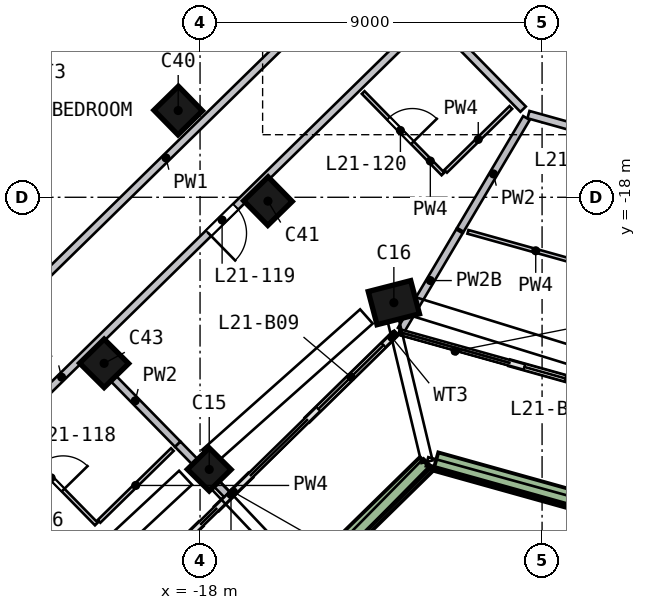
"""IFC4 building model, lengths in metres.
Left out: names, types, materials, properties, quantities, classifications, styles, units other than length and angle.
Written with IfcOpenShell. Run it as: python <this file> out.ifc"""

import sys

from ifc_helpers import new_model, si_unit, direction, frame, frame_2d, origin, origin_2d, place, context, subcontext, project, spatial, rectangle, extrude, element, fill, save


model = new_model("IFC4")
c1 = context("Model", 3, precision=1e-05, world=origin(), true_north=direction((0.0, 1.0)))
c2 = subcontext(c1, "Body", "Model", "MODEL_VIEW")
j1 = project(units=[si_unit("LENGTHUNIT", "METRE"), si_unit("PLANEANGLEUNIT", "RADIAN")], contexts=[c1])
p1 = place(None, origin())
s1 = spatial("IfcSite", under=j1, at=p1, CompositionType="ELEMENT")
p2 = place(p1, origin())
s2 = spatial("IfcBuilding", under=s1, at=p2, CompositionType="ELEMENT")
p3 = place(p2, frame((0.0, 0.0, 93.0)))
s3 = spatial("IfcBuildingStorey", under=s2, at=p3, CompositionType="ELEMENT", Elevation=93.0)
p4 = place(p3, frame((-17.97, -25.128, 0.0), z_axis=(0.173806218, -0.028251986, 0.984374534), x_axis=(0.700000107, 0.706629929, -0.103315018)))
e1 = element("IfcColumn", 1, at=p4, inside=s3, PredefinedType="COLUMN", context=c2, shape_type="SweptSolid", body=[
    extrude(rectangle(XDim=0.8, YDim=0.8, at=origin_2d()), origin(), (0.0, 0.0, 1.0), 3.24),
])
p5 = place(p3, frame((-13.02, -20.7, 0.0), z_axis=(0.098896689, -0.061040769, 0.993223776), x_axis=(-0.963723758, -0.254530475, 0.080316596)))
e2 = element("IfcColumn", 2, at=p5, inside=s3, PredefinedType="COLUMN", context=c2, shape_type="SweptSolid", body=[
    extrude(rectangle(XDim=1.15, YDim=0.9, at=origin_2d()), origin(), (0.0, 0.0, 1.0), 3.212),
])
for number, where, z_axis, x_axis in (
    (3, (-18.666, -15.611, 0.0), (0.075, -0.088, 0.993), (-0.715, -0.699, -0.008)),
    (4, (-16.317, -18.009, 0.0), (0.086, -0.077, 0.993), (-0.714, -0.7, 0.008)),
):
    element("IfcColumn", number, at=place(p3, frame(where, z_axis=z_axis, x_axis=x_axis)), inside=s3, PredefinedType="COLUMN", context=c2, shape_type="SweptSolid", body=[
        extrude(rectangle(XDim=0.9, YDim=0.9, at=origin_2d()), origin(), (0.0, 0.0, 1.0), 3.211),
    ])
p6 = place(p3, frame((-20.72, -22.32, 0.0), z_axis=(0.160977031, -0.041432907, 0.986088084), x_axis=(-0.70323062, -0.705845109, 0.085143269)))
e5 = element("IfcColumn", 5, at=p6, inside=s3, PredefinedType="COLUMN", context=c2, shape_type="SweptSolid", body=[
    extrude(rectangle(XDim=0.9, YDim=0.9, at=origin_2d()), origin(), (0.0, 0.0, 1.0), 3.235),
])
p7 = place(p3, frame((-21.877, -12.431, 0.0), z_axis=(0.0, 0.0, 1.0), x_axis=(-0.71448032, -0.699655539, 0.0)))
e6 = element("IfcWall", 6, at=p7, inside=s3, PredefinedType="SOLIDWALL", context=c2, shape_type="SweptSolid", body=[
    extrude(rectangle(XDim=3.294, YDim=0.15, at=frame_2d((1.647, 0.0))), origin(), (0.0, 0.0, 1.0), 2.425),
])
p8 = place(p7, frame((0.494, 0.0, 0.0)))
e7 = element("IfcOpeningElement", 7, at=p8, cuts=e6, PredefinedType="OPENING", context=c2, shape_type="SweptSolid", body=[
    extrude(rectangle(XDim=2.4, YDim=2.4, at=frame_2d((1.2, 1.2))), frame((0.0, 0.085, 0.0), z_axis=(0.0, -1.0, 0.0), x_axis=(1.0, 0.0, 0.0)), (0.0, 0.0, 1.0), 0.17),
])
p9 = place(p3, frame((-21.485, -30.032, 0.0), z_axis=(0.0, 0.0, 1.0), x_axis=(0.714467355, 0.699668778, 0.0)))
e8 = element("IfcWall", 8, at=p9, inside=s3, PredefinedType="SOLIDWALL", context=c2, shape_type="SweptSolid", body=[
    extrude(rectangle(XDim=4.9, YDim=0.15, at=frame_2d((2.45, 0.0))), origin(), (0.0, 0.0, 1.0), 2.425),
])
p10 = place(p9, frame((2.1, 0.0, 0.0)))
e9 = element("IfcOpeningElement", 9, at=p10, cuts=e8, PredefinedType="OPENING", context=c2, shape_type="SweptSolid", body=[
    extrude(rectangle(XDim=2.4, YDim=2.4, at=frame_2d((1.2, 1.2))), frame((0.0, 0.085, 0.0), z_axis=(0.0, -1.0, 0.0), x_axis=(1.0, 0.0, 0.0)), (0.0, 0.0, 1.0), 0.17),
])
p11 = place(p3, frame((-15.173, -23.851, 0.0), z_axis=(0.0, 0.0, 1.0), x_axis=(0.714468315, 0.699667797, 0.0)))
e10 = element("IfcWall", 10, at=p11, inside=s3, PredefinedType="SOLIDWALL", context=c2, shape_type="SweptSolid", body=[
    extrude(rectangle(XDim=3.2, YDim=0.15, at=frame_2d((1.6, 0.0))), origin(), (0.0, 0.0, 1.0), 2.425),
])
p12 = place(p11, frame((0.4, 0.0, 0.0)))
e11 = element("IfcOpeningElement", 11, at=p12, cuts=e10, PredefinedType="OPENING", context=c2, shape_type="SweptSolid", body=[
    extrude(rectangle(XDim=2.4, YDim=2.4, at=frame_2d((1.2, 1.2))), frame((0.0, 0.085, 0.0), z_axis=(0.0, -1.0, 0.0), x_axis=(1.0, 0.0, 0.0)), (0.0, 0.0, 1.0), 0.17),
])
p13 = place(p3, frame((-17.561, -26.189, 0.0), z_axis=(0.0, 0.0, 1.0), x_axis=(0.714463189, 0.699673032, 0.0)))
e12 = element("IfcWall", 12, at=p13, inside=s3, PredefinedType="SOLIDWALL", context=c2, shape_type="SweptSolid", body=[
    extrude(rectangle(XDim=1.238, YDim=0.15, at=frame_2d((0.619, 0.0))), origin(), (0.0, 0.0, 1.0), 2.425),
])
p14 = place(p3, frame((-9.85, -22.358, 0.0), z_axis=(0.0, 0.0, 1.0), x_axis=(0.96315568, -0.268944485, 0.0)))
e13 = element("IfcWall", 13, at=p14, inside=s3, PredefinedType="SOLIDWALL", context=c2, shape_type="SweptSolid", body=[
    extrude(rectangle(XDim=3.475, YDim=0.15, at=frame_2d((1.737, 0.0))), origin(), (0.0, 0.0, 1.0), 2.425),
])
p15 = place(p14, frame((0.4, 0.0, 0.0)))
e14 = element("IfcOpeningElement", 14, at=p15, cuts=e13, PredefinedType="OPENING", context=c2, shape_type="SweptSolid", body=[
    extrude(rectangle(XDim=2.4, YDim=2.4, at=frame_2d((1.2, 1.2))), frame((0.0, 0.085, 0.0), z_axis=(0.0, -1.0, 0.0), x_axis=(1.0, 0.0, 0.0)), (0.0, 0.0, 1.0), 0.17),
])
p16 = place(p3, frame((-19.168, -31.997, 0.0), z_axis=(0.0, 0.0, 1.0), x_axis=(0.714470668, 0.699665395, 0.0)))
e15 = element("IfcWall", 15, at=p16, inside=s3, PredefinedType="SOLIDWALL", context=c2, shape_type="SweptSolid", body=[
    extrude(rectangle(XDim=9.977, YDim=0.5, at=frame_2d((4.988, 0.0))), origin(), (0.0, 0.0, 1.0), 0.7),
])
p17 = place(p3, frame((-11.798, -24.955, 0.0), z_axis=(0.0, 0.0, 1.0), x_axis=(0.963157935, -0.26893641, 0.0)))
e16 = element("IfcWall", 16, at=p17, inside=s3, PredefinedType="SOLIDWALL", context=c2, shape_type="SweptSolid", body=[
    extrude(rectangle(XDim=11.152, YDim=0.5, at=frame_2d((5.576, 0.0))), origin(), (0.0, 0.0, 1.0), 0.7),
])
p18 = place(p3, frame((-26.907, -24.809, 0.0), z_axis=(0.0, 0.0, 1.0), x_axis=(0.714474521, 0.699661461, 0.0)))
e17 = element("IfcWall", 17, at=p18, inside=s3, PredefinedType="SOLIDWALL", context=c2, shape_type="SweptSolid", body=[
    extrude(rectangle(XDim=18.624, YDim=0.2, at=frame_2d((9.312, 0.0))), origin(), (0.0, 0.0, 1.0), 3.19),
])
p19 = place(p18, frame((2.6, 0.0, 0.0)))
e18 = element("IfcOpeningElement", 18, at=p19, cuts=e17, PredefinedType="OPENING", context=c2, shape_type="SweptSolid", body=[
    extrude(rectangle(XDim=1.0, YDim=2.1, at=frame_2d((0.5, 1.05))), frame((0.0, 0.11, 0.0), z_axis=(0.0, -1.0, 0.0), x_axis=(1.0, 0.0, 0.0)), (0.0, 0.0, 1.0), 0.22),
])
p20 = place(p3, frame((-12.061, -13.351, 0.0), z_axis=(0.0, 0.0, 1.0), x_axis=(-0.714474521, -0.699661461, 0.0)))
e19 = element("IfcWall", 19, at=p20, inside=s3, PredefinedType="SOLIDWALL", context=c2, shape_type="SweptSolid", body=[
    extrude(rectangle(XDim=18.624, YDim=0.2, at=frame_2d((9.312, 0.0))), origin(), (0.0, 0.0, 1.0), 3.19),
])
p21 = place(p20, frame((7.0, 0.0, 0.0)))
e20 = element("IfcOpeningElement", 20, at=p21, cuts=e19, PredefinedType="OPENING", context=c2, shape_type="SweptSolid", body=[
    extrude(rectangle(XDim=1.0, YDim=2.1, at=frame_2d((0.5, 1.05))), frame((0.0, 0.11, 0.0), z_axis=(0.0, -1.0, 0.0), x_axis=(1.0, 0.0, 0.0)), (0.0, 0.0, 1.0), 0.22),
])
p22 = place(p3, frame((-11.918, -13.211, 0.0), z_axis=(0.0, 0.0, 1.0), x_axis=(0.699655576, -0.714480283, 0.0)))
e21 = element("IfcWall", 21, at=p22, inside=s3, PredefinedType="SOLIDWALL", context=c2, shape_type="SweptSolid", body=[
    extrude(rectangle(XDim=3.458, YDim=0.2, at=frame_2d((1.729, 0.0))), origin(), (0.0, 0.0, 1.0), 3.19),
])
p23 = place(p3, frame((-0.192, -18.384, 0.0), z_axis=(0.0, 0.0, 1.0), x_axis=(-0.963160921, 0.268925714, 0.0)))
e22 = element("IfcWall", 22, at=p23, inside=s3, PredefinedType="SOLIDWALL", context=c2, shape_type="SweptSolid", body=[
    extrude(rectangle(XDim=9.517, YDim=0.2, at=frame_2d((4.758, 0.0))), origin(), (0.0, 0.0, 1.0), 3.19),
])
p24 = place(p23, frame((1.9, 0.0, 0.0)))
e23 = element("IfcOpeningElement", 23, at=p24, cuts=e22, PredefinedType="OPENING", context=c2, shape_type="SweptSolid", body=[
    extrude(rectangle(XDim=1.0, YDim=2.1, at=frame_2d((0.5, 1.05))), frame((0.0, 0.11, 0.0), z_axis=(0.0, -1.0, 0.0), x_axis=(1.0, 0.0, 0.0)), (0.0, 0.0, 1.0), 0.22),
])
p25 = place(p3, frame((-20.825, -22.213, 0.0), z_axis=(0.0, 0.0, 1.0), x_axis=(0.699705936, -0.714430965, 0.0)))
e24 = element("IfcWall", 24, at=p25, inside=s3, PredefinedType="SOLIDWALL", context=c2, shape_type="SweptSolid", body=[
    extrude(rectangle(XDim=3.2, YDim=0.2, at=frame_2d((1.6, 0.0))), origin(), (0.0, 0.0, 1.0), 3.19),
])
p26 = place(p3, frame((-18.586, -24.499, 0.0), z_axis=(0.0, 0.0, 1.0), x_axis=(0.699678126, -0.7144582, 0.0)))
e25 = element("IfcWall", 25, at=p26, inside=s3, PredefinedType="SOLIDWALL", context=c2, shape_type="SweptSolid", body=[
    extrude(rectangle(XDim=1.85, YDim=0.2, at=frame_2d((0.925, 0.0))), origin(), (0.0, 0.0, 1.0), 3.19),
])
p27 = place(p3, frame((-11.175, -18.896, 0.0), z_axis=(0.0, 0.0, 1.0), x_axis=(-0.509048846, -0.860737633, 0.0)))
e26 = element("IfcWall", 26, at=p27, inside=s3, PredefinedType="SOLIDWALL", context=c2, shape_type="SweptSolid", body=[
    extrude(rectangle(XDim=3.011, YDim=0.2, at=frame_2d((1.506, 0.0))), origin(), (0.0, 0.0, 1.0), 2.69),
])
p28 = place(p3, frame((-9.411, -15.914, 0.0), z_axis=(0.0, 0.0, 1.0), x_axis=(-0.50904451, -0.860740197, 0.0)))
e27 = element("IfcWall", 27, at=p28, inside=s3, PredefinedType="SOLIDWALL", context=c2, shape_type="SweptSolid", body=[
    extrude(rectangle(XDim=3.418, YDim=0.2, at=frame_2d((1.709, 0.0))), origin(), (0.0, 0.0, 1.0), 3.19),
])
p29 = place(p3, frame((-22.968, -24.312, 0.0), z_axis=(0.0, 0.0, 1.0), x_axis=(0.69962885, -0.714506454, 0.0)))
e28 = element("IfcWall", 28, at=p29, inside=s3, PredefinedType="PARTITIONING", context=c2, shape_type="SweptSolid", body=[
    extrude(rectangle(XDim=3.2, YDim=0.1, at=frame_2d((1.6, 0.0))), origin(), (0.0, 0.0, 1.0), 3.19),
])
p30 = place(p29, frame((1.05, 0.0, 0.0)))
e29 = element("IfcOpeningElement", 29, at=p30, cuts=e28, PredefinedType="OPENING", context=c2, shape_type="SweptSolid", body=[
    extrude(rectangle(XDim=0.9, YDim=2.1, at=frame_2d((0.45, 1.05))), frame((0.0, 0.06, 0.0), z_axis=(0.0, -1.0, 0.0), x_axis=(1.0, 0.0, 0.0)), (0.0, 0.0, 1.0), 0.12),
])
p31 = place(p3, frame((-20.658, -26.528, 0.0), z_axis=(0.0, 0.0, 1.0), x_axis=(0.714437911, 0.699698843, 0.0)))
e30 = element("IfcWall", 30, at=p31, inside=s3, PredefinedType="PARTITIONING", context=c2, shape_type="SweptSolid", body=[
    extrude(rectangle(XDim=2.7, YDim=0.1, at=frame_2d((1.35, 0.0))), origin(), (0.0, 0.0, 1.0), 3.19),
])
p32 = place(p3, frame((-13.708, -15.243, 0.0), z_axis=(0.0, 0.0, 1.0), x_axis=(0.699703553, -0.714433298, 0.0)))
e31 = element("IfcWall", 31, at=p32, inside=s3, PredefinedType="PARTITIONING", context=c2, shape_type="SweptSolid", body=[
    extrude(rectangle(XDim=3.0, YDim=0.1, at=frame_2d((1.5, 0.0))), origin(), (0.0, 0.0, 1.0), 3.19),
])
p33 = place(p32, frame((0.95, 0.0, 0.0)))
e32 = element("IfcOpeningElement", 32, at=p33, cuts=e31, PredefinedType="OPENING", context=c2, shape_type="SweptSolid", body=[
    extrude(rectangle(XDim=0.9, YDim=2.1, at=frame_2d((0.45, 1.05))), frame((0.0, 0.06, 0.0), z_axis=(0.0, -1.0, 0.0), x_axis=(1.0, 0.0, 0.0)), (0.0, 0.0, 1.0), 0.12),
])
p34 = place(p3, frame((-9.822, -15.637, 0.0), z_axis=(0.0, 0.0, 1.0), x_axis=(-0.714443678, -0.699692954, 0.0)))
e33 = element("IfcWall", 33, at=p34, inside=s3, PredefinedType="PARTITIONING", context=c2, shape_type="SweptSolid", body=[
    extrude(rectangle(XDim=2.4, YDim=0.1, at=frame_2d((1.2, 0.0))), origin(), (0.0, 0.0, 1.0), 3.19),
])
p35 = place(p3, frame((-10.951, -18.91, 0.0), z_axis=(0.0, 0.0, 1.0), x_axis=(0.963158191, -0.268935493, 0.0)))
e34 = element("IfcWall", 34, at=p35, inside=s3, PredefinedType="PARTITIONING", context=c2, shape_type="SweptSolid", body=[
    extrude(rectangle(XDim=3.704, YDim=0.1, at=frame_2d((1.852, 0.0))), origin(), (0.0, 0.0, 1.0), 3.19),
])
p36 = place(p12, origin())
e35 = element("IfcDoor", 35, at=p36, inside=s3, OperationType="SLIDING_TO_RIGHT", PredefinedType="DOOR", context=c2, shape_type="SweptSolid", body=[
    extrude(rectangle(XDim=2.4, YDim=2.4, at=frame_2d((1.2, 1.2))), frame((0.0, 0.025, 0.0), z_axis=(0.0, -1.0, 0.0), x_axis=(1.0, 0.0, 0.0)), (0.0, 0.0, 1.0), 0.05),
])
fill(e11, e35)
p37 = place(p15, origin())
e36 = element("IfcDoor", 36, at=p37, inside=s3, OperationType="SLIDING_TO_RIGHT", PredefinedType="DOOR", context=c2, shape_type="SweptSolid", body=[
    extrude(rectangle(XDim=2.4, YDim=2.4, at=frame_2d((1.2, 1.2))), frame((0.0, 0.025, 0.0), z_axis=(0.0, -1.0, 0.0), x_axis=(1.0, 0.0, 0.0)), (0.0, 0.0, 1.0), 0.05),
])
fill(e14, e36)
p38 = place(p30, origin())
e37 = element("IfcDoor", 37, at=p38, inside=s3, OperationType="SINGLE_SWING_RIGHT", PredefinedType="DOOR", context=c2, shape_type="SweptSolid", body=[
    extrude(rectangle(XDim=0.9, YDim=2.1, at=frame_2d((0.45, 1.05))), frame((0.0, 0.025, 0.0), z_axis=(0.0, -1.0, 0.0), x_axis=(1.0, 0.0, 0.0)), (0.0, 0.0, 1.0), 0.05),
])
fill(e29, e37)
p39 = place(p21, origin())
e38 = element("IfcDoor", 38, at=p39, inside=s3, OperationType="SINGLE_SWING_RIGHT", PredefinedType="DOOR", context=c2, shape_type="SweptSolid", body=[
    extrude(rectangle(XDim=1.0, YDim=2.1, at=frame_2d((0.5, 1.05))), frame((0.0, 0.025, 0.0), z_axis=(0.0, -1.0, 0.0), x_axis=(1.0, 0.0, 0.0)), (0.0, 0.0, 1.0), 0.05),
])
fill(e20, e38)
p40 = place(p33, origin())
e39 = element("IfcDoor", 39, at=p40, inside=s3, OperationType="SINGLE_SWING_RIGHT", PredefinedType="DOOR", context=c2, shape_type="SweptSolid", body=[
    extrude(rectangle(XDim=0.9, YDim=2.1, at=frame_2d((0.45, 1.05))), frame((0.0, 0.025, 0.0), z_axis=(0.0, -1.0, 0.0), x_axis=(1.0, 0.0, 0.0)), (0.0, 0.0, 1.0), 0.05),
])
fill(e32, e39)
save(model, sys.argv[1])
